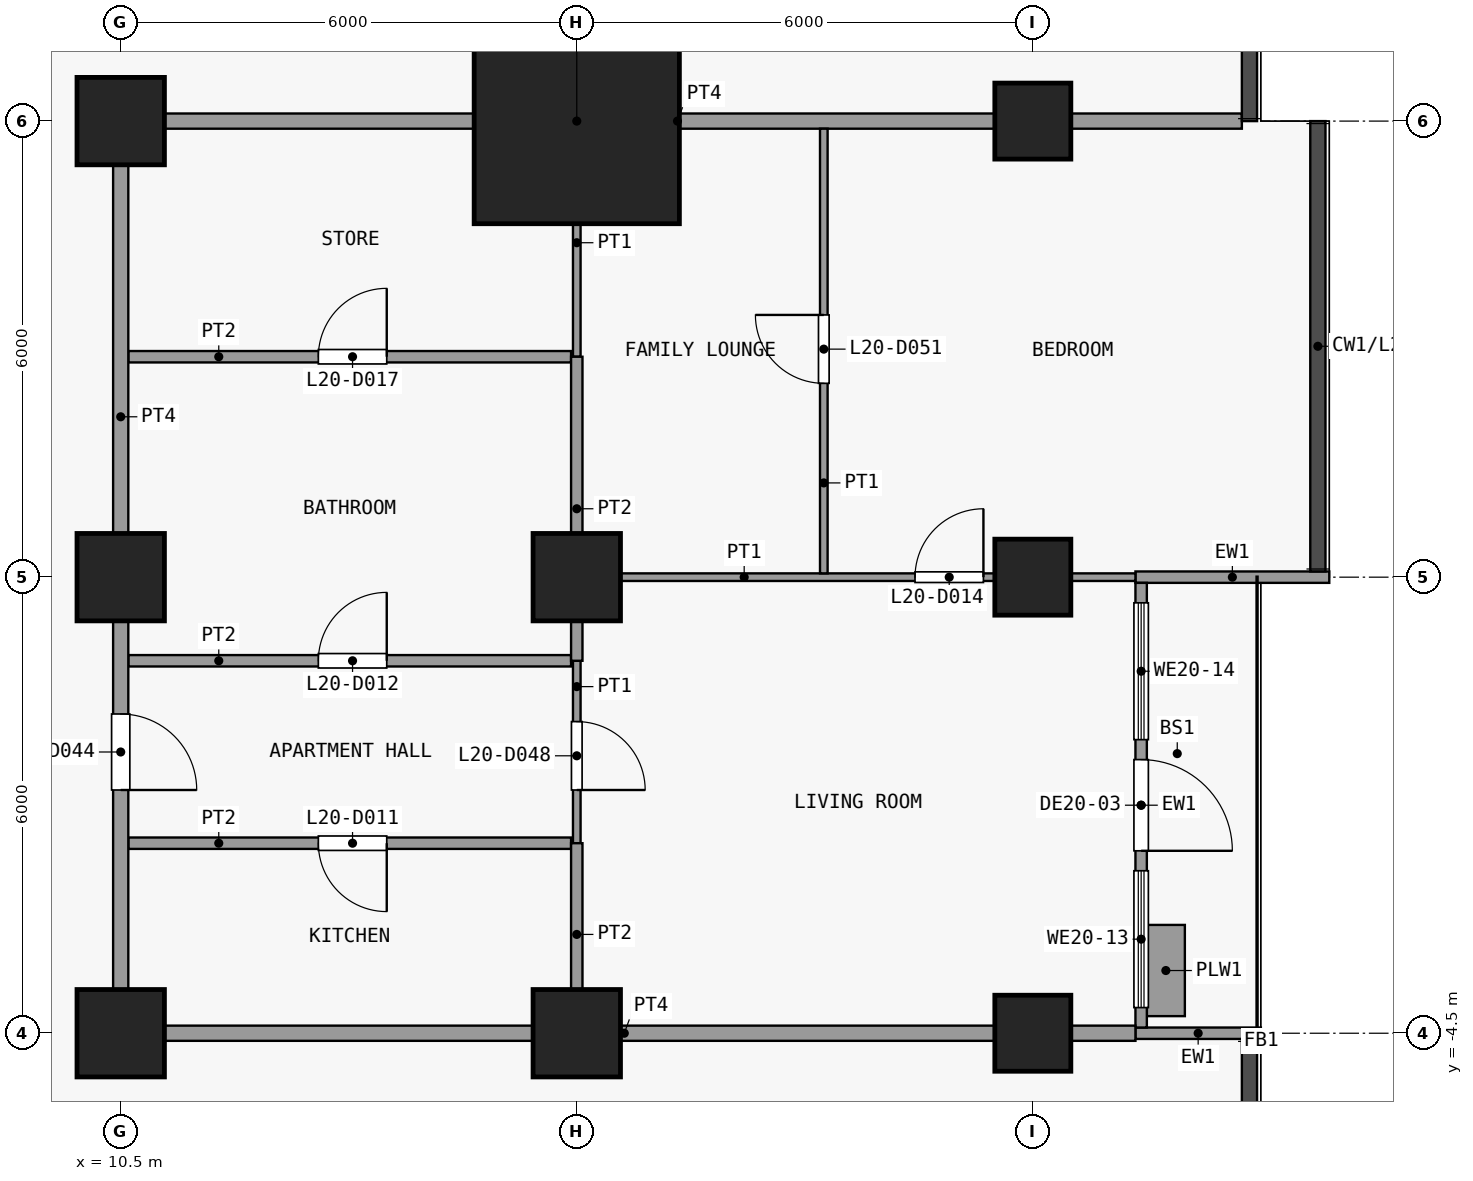
"""IFC4 building model, lengths in metres.
Left out: names, types, materials, properties, quantities, classifications, styles, units other than length and angle.
Written with IfcOpenShell. Run it as: python <this file> out.ifc"""

import sys

from ifc_helpers import new_model, si_unit, direction, frame, frame_2d, origin, origin_2d, place, context, subcontext, project, spatial, rectangle, extrude, element, fill, save


model = new_model("IFC4")
c1 = context("Model", 3, precision=1e-05, world=origin(), true_north=direction((0.0, 1.0)))
c2 = subcontext(c1, "Body", "Model", "MODEL_VIEW")
j1 = project(units=[si_unit("LENGTHUNIT", "METRE"), si_unit("PLANEANGLEUNIT", "RADIAN")], contexts=[c1])
p1 = place(None, origin())
s1 = spatial("IfcSite", under=j1, at=p1, CompositionType="ELEMENT")
p2 = place(p1, origin())
s2 = spatial("IfcBuilding", under=s1, at=p2, CompositionType="ELEMENT")
p3 = place(p2, frame((0.0, 0.0, 84.7)))
s3 = spatial("IfcBuildingStorey", under=s2, at=p3, CompositionType="ELEMENT", Elevation=84.7)
for number, where, z_axis, x_axis in (
    (1, (10.5, -4.5, 0.0), (0.0, 0.0, 1.0), (1.0, 0.0, 0.0)),
    (2, (10.5, 1.5, 0.0), (0.0, 0.0, 1.0), (1.0, 0.0, 0.0)),
    (3, (10.5, 7.5, 0.0), (0.0, 0.0, 1.0), (1.0, 0.0, 0.0)),
    (4, (16.5, -4.5, 0.0), (0.0, 0.0, 1.0), (1.0, 0.0, 0.0)),
    (5, (16.5, 1.5, 0.0), (0.0, 0.0, 1.0), (1.0, 0.0, 0.0)),
):
    element("IfcColumn", number, at=place(p3, frame(where, z_axis=z_axis, x_axis=x_axis)), inside=s3, PredefinedType="COLUMN", context=c2, shape_type="SweptSolid", body=[
        extrude(rectangle(XDim=1.15, YDim=1.15, at=origin_2d()), origin(), (0.0, 0.0, 1.0), 3.6),
    ])
p4 = place(p3, frame((16.5, 7.5, 0.0), z_axis=(0.0, 0.0, 1.0), x_axis=(1.0, 0.0, 0.0)))
e6 = element("IfcColumn", 6, at=p4, inside=s3, PredefinedType="COLUMN", context=c2, shape_type="SweptSolid", body=[
    extrude(rectangle(XDim=2.7, YDim=2.7, at=origin_2d()), origin(), (0.0, 0.0, 1.0), 3.6),
])
for number, where, z_axis, x_axis in (
    (7, (22.5, -4.5, 0.0), (0.0, 0.0, 1.0), (1.0, 0.0, 0.0)),
    (8, (22.5, 1.5, 0.0), (0.0, 0.0, 1.0), (1.0, 0.0, 0.0)),
    (9, (22.5, 7.5, 0.0), (0.0, 0.0, 1.0), (1.0, 0.0, 0.0)),
):
    element("IfcColumn", number, at=place(p3, frame(where, z_axis=z_axis, x_axis=x_axis)), inside=s3, PredefinedType="COLUMN", context=c2, shape_type="SweptSolid", body=[
        extrude(rectangle(XDim=1.0, YDim=1.0, at=origin_2d()), origin(), (0.0, 0.0, 1.0), 3.6),
    ])
p5 = place(p3, frame((23.85, -4.5, 0.0), z_axis=(0.0, 0.0, 1.0), x_axis=(1.0, 0.0, 0.0)))
e10 = element("IfcWall", 10, at=p5, inside=s3, PredefinedType="SOLIDWALL", context=c2, shape_type="SweptSolid", body=[
    extrude(rectangle(XDim=1.65, YDim=0.15, at=frame_2d((0.825, 0.0))), origin(), (0.0, 0.0, 1.0), 3.3),
])
p6 = place(p3, frame((23.85, 1.5, 0.0), z_axis=(0.0, 0.0, 1.0), x_axis=(1.0, 0.0, 0.0)))
e11 = element("IfcWall", 11, at=p6, inside=s3, PredefinedType="SOLIDWALL", context=c2, shape_type="SweptSolid", body=[
    extrude(rectangle(XDim=2.55, YDim=0.15, at=frame_2d((1.275, 0.0))), origin(), (0.0, 0.0, 1.0), 3.3),
])
p7 = place(p3, frame((23.925, 1.425, 0.0), z_axis=(0.0, 0.0, 1.0), x_axis=(0.0, -1.0, 0.0)))
e12 = element("IfcWall", 12, at=p7, inside=s3, PredefinedType="SOLIDWALL", context=c2, shape_type="SweptSolid", body=[
    extrude(rectangle(XDim=5.85, YDim=0.15, at=frame_2d((2.925, 0.0))), origin(), (0.0, 0.0, 1.0), 3.3),
])
p8 = place(p7, frame((2.325, 0.0, 0.0)))
e13 = element("IfcOpeningElement", 13, at=p8, cuts=e12, PredefinedType="OPENING", context=c2, shape_type="SweptSolid", body=[
    extrude(rectangle(XDim=1.2, YDim=2.4, at=frame_2d((0.6, 1.2))), frame((0.0, 0.085, 0.0), z_axis=(0.0, -1.0, 0.0), x_axis=(1.0, 0.0, 0.0)), (0.0, 0.0, 1.0), 0.17),
])
p9 = place(p7, frame((3.788, 0.0, 0.9)))
e14 = element("IfcOpeningElement", 14, at=p9, cuts=e12, PredefinedType="OPENING", context=c2, shape_type="SweptSolid", body=[
    extrude(rectangle(XDim=1.8, YDim=2.1, at=frame_2d((0.9, 1.05))), frame((0.0, 0.085, 0.0), z_axis=(0.0, -1.0, 0.0), x_axis=(1.0, 0.0, 0.0)), (0.0, 0.0, 1.0), 0.17),
])
p10 = place(p7, frame((0.262, 0.0, 0.9)))
e15 = element("IfcOpeningElement", 15, at=p10, cuts=e12, PredefinedType="OPENING", context=c2, shape_type="SweptSolid", body=[
    extrude(rectangle(XDim=1.8, YDim=2.1, at=frame_2d((0.9, 1.05))), frame((0.0, 0.085, 0.0), z_axis=(0.0, -1.0, 0.0), x_axis=(1.0, 0.0, 0.0)), (0.0, 0.0, 1.0), 0.17),
])
p11 = place(p3, frame((24.25, -4.275, 0.0), z_axis=(0.0, 0.0, 1.0), x_axis=(0.0, 1.0, 0.0)))
e16 = element("IfcWall", 16, at=p11, inside=s3, PredefinedType="USERDEFINED", context=c2, shape_type="SweptSolid", body=[
    extrude(rectangle(XDim=1.2, YDim=0.5, at=frame_2d((0.6, 0.0))), origin(), (0.0, 0.0, 1.0), 0.9),
])
p12 = place(p3, frame((10.4, -4.5, 0.0), z_axis=(0.0, 0.0, 1.0), x_axis=(1.0, 0.0, 0.0)))
e17 = element("IfcWall", 17, at=p12, inside=s3, PredefinedType="PARTITIONING", context=c2, shape_type="SweptSolid", body=[
    extrude(rectangle(XDim=13.45, YDim=0.2, at=frame_2d((6.725, 0.0))), origin(), (0.0, 0.0, 1.0), 3.3),
])
p13 = place(p3, frame((10.6, -2.0, 0.0), z_axis=(0.0, 0.0, 1.0), x_axis=(1.0, 0.0, 0.0)))
e18 = element("IfcWall", 18, at=p13, inside=s3, PredefinedType="PARTITIONING", context=c2, shape_type="SweptSolid", body=[
    extrude(rectangle(XDim=5.825, YDim=0.15, at=frame_2d((2.913, 0.0))), origin(), (0.0, 0.0, 1.0), 3.3),
])
p14 = place(p13, frame((2.5, 0.0, 0.0)))
e19 = element("IfcOpeningElement", 19, at=p14, cuts=e18, PredefinedType="OPENING", context=c2, shape_type="SweptSolid", body=[
    extrude(rectangle(XDim=0.9, YDim=2.1, at=frame_2d((0.45, 1.05))), frame((0.0, 0.085, 0.0), z_axis=(0.0, -1.0, 0.0), x_axis=(1.0, 0.0, 0.0)), (0.0, 0.0, 1.0), 0.17),
])
p15 = place(p3, frame((10.6, 0.4, 0.0), z_axis=(0.0, 0.0, 1.0), x_axis=(1.0, 0.0, 0.0)))
e20 = element("IfcWall", 20, at=p15, inside=s3, PredefinedType="PARTITIONING", context=c2, shape_type="SweptSolid", body=[
    extrude(rectangle(XDim=5.825, YDim=0.15, at=frame_2d((2.913, 0.0))), origin(), (0.0, 0.0, 1.0), 3.3),
])
p16 = place(p15, frame((2.5, 0.0, 0.0)))
e21 = element("IfcOpeningElement", 21, at=p16, cuts=e20, PredefinedType="OPENING", context=c2, shape_type="SweptSolid", body=[
    extrude(rectangle(XDim=0.9, YDim=2.1, at=frame_2d((0.45, 1.05))), frame((0.0, 0.085, 0.0), z_axis=(0.0, -1.0, 0.0), x_axis=(1.0, 0.0, 0.0)), (0.0, 0.0, 1.0), 0.17),
])
p17 = place(p3, frame((16.575, 1.5, 0.0), z_axis=(0.0, 0.0, 1.0), x_axis=(1.0, 0.0, 0.0)))
e22 = element("IfcWall", 22, at=p17, inside=s3, PredefinedType="PARTITIONING", context=c2, shape_type="SweptSolid", body=[
    extrude(rectangle(XDim=7.275, YDim=0.1, at=frame_2d((3.638, 0.0))), origin(), (0.0, 0.0, 1.0), 3.3),
])
p18 = place(p17, frame((4.375, 0.0, 0.0)))
e23 = element("IfcOpeningElement", 23, at=p18, cuts=e22, PredefinedType="OPENING", context=c2, shape_type="SweptSolid", body=[
    extrude(rectangle(XDim=0.9, YDim=2.1, at=frame_2d((0.45, 1.05))), frame((0.0, 0.06, 0.0), z_axis=(0.0, -1.0, 0.0), x_axis=(1.0, 0.0, 0.0)), (0.0, 0.0, 1.0), 0.12),
])
p19 = place(p3, frame((10.6, 4.4, 0.0), z_axis=(0.0, 0.0, 1.0), x_axis=(1.0, 0.0, 0.0)))
e24 = element("IfcWall", 24, at=p19, inside=s3, PredefinedType="PARTITIONING", context=c2, shape_type="SweptSolid", body=[
    extrude(rectangle(XDim=5.825, YDim=0.15, at=frame_2d((2.913, 0.0))), origin(), (0.0, 0.0, 1.0), 3.3),
])
p20 = place(p19, frame((2.5, 0.0, 0.0)))
e25 = element("IfcOpeningElement", 25, at=p20, cuts=e24, PredefinedType="OPENING", context=c2, shape_type="SweptSolid", body=[
    extrude(rectangle(XDim=0.9, YDim=2.1, at=frame_2d((0.45, 1.05))), frame((0.0, 0.085, 0.0), z_axis=(0.0, -1.0, 0.0), x_axis=(1.0, 0.0, 0.0)), (0.0, 0.0, 1.0), 0.17),
])
p21 = place(p3, frame((10.4, 7.5, 0.0), z_axis=(0.0, 0.0, 1.0), x_axis=(1.0, 0.0, 0.0)))
e26 = element("IfcWall", 26, at=p21, inside=s3, PredefinedType="PARTITIONING", context=c2, shape_type="SweptSolid", body=[
    extrude(rectangle(XDim=14.85, YDim=0.2, at=frame_2d((7.425, 0.0))), origin(), (0.0, 0.0, 1.0), 3.3),
])
p22 = place(p3, frame((10.5, -4.4, 0.0), z_axis=(0.0, 0.0, 1.0), x_axis=(0.0, 1.0, 0.0)))
e27 = element("IfcWall", 27, at=p22, inside=s3, PredefinedType="PARTITIONING", context=c2, shape_type="SweptSolid", body=[
    extrude(rectangle(XDim=11.8, YDim=0.2, at=frame_2d((5.9, 0.0))), origin(), (0.0, 0.0, 1.0), 3.3),
])
p23 = place(p22, frame((3.1, 0.0, 0.0)))
e28 = element("IfcOpeningElement", 28, at=p23, cuts=e27, PredefinedType="OPENING", context=c2, shape_type="SweptSolid", body=[
    extrude(rectangle(XDim=1.0, YDim=2.1, at=frame_2d((0.5, 1.05))), frame((0.0, 0.11, 0.0), z_axis=(0.0, -1.0, 0.0), x_axis=(1.0, 0.0, 0.0)), (0.0, 0.0, 1.0), 0.22),
])
p24 = place(p3, frame((16.5, -2.0, 0.0), z_axis=(0.0, 0.0, 1.0), x_axis=(0.0, 1.0, 0.0)))
e29 = element("IfcWall", 29, at=p24, inside=s3, PredefinedType="PARTITIONING", context=c2, shape_type="SweptSolid", body=[
    extrude(rectangle(XDim=2.4, YDim=0.1, at=frame_2d((1.2, 0.0))), origin(), (0.0, 0.0, 1.0), 3.3),
])
p25 = place(p24, frame((0.7, 0.0, 0.0)))
e30 = element("IfcOpeningElement", 30, at=p25, cuts=e29, PredefinedType="OPENING", context=c2, shape_type="SweptSolid", body=[
    extrude(rectangle(XDim=0.9, YDim=2.1, at=frame_2d((0.45, 1.05))), frame((0.0, 0.06, 0.0), z_axis=(0.0, -1.0, 0.0), x_axis=(1.0, 0.0, 0.0)), (0.0, 0.0, 1.0), 0.12),
])
p26 = place(p3, frame((16.5, 4.4, 0.0), z_axis=(0.0, 0.0, 1.0), x_axis=(0.0, 1.0, 0.0)))
e31 = element("IfcWall", 31, at=p26, inside=s3, PredefinedType="PARTITIONING", context=c2, shape_type="SweptSolid", body=[
    extrude(rectangle(XDim=3.0, YDim=0.1, at=frame_2d((1.5, 0.0))), origin(), (0.0, 0.0, 1.0), 3.3),
])
p27 = place(p3, frame((16.5, -4.4, 0.0), z_axis=(0.0, 0.0, 1.0), x_axis=(0.0, 1.0, 0.0)))
e32 = element("IfcWall", 32, at=p27, inside=s3, PredefinedType="PARTITIONING", context=c2, shape_type="SweptSolid", body=[
    extrude(rectangle(XDim=2.4, YDim=0.15, at=frame_2d((1.2, 0.0))), origin(), (0.0, 0.0, 1.0), 3.3),
])
p28 = place(p3, frame((16.5, 0.4, 0.0), z_axis=(0.0, 0.0, 1.0), x_axis=(0.0, 1.0, 0.0)))
e33 = element("IfcWall", 33, at=p28, inside=s3, PredefinedType="PARTITIONING", context=c2, shape_type="SweptSolid", body=[
    extrude(rectangle(XDim=4.0, YDim=0.15, at=frame_2d((2.0, 0.0))), origin(), (0.0, 0.0, 1.0), 3.3),
])
p29 = place(p3, frame((19.75, 1.55, 0.0), z_axis=(0.0, 0.0, 1.0), x_axis=(0.0, 1.0, 0.0)))
e34 = element("IfcWall", 34, at=p29, inside=s3, PredefinedType="PARTITIONING", context=c2, shape_type="SweptSolid", body=[
    extrude(rectangle(XDim=5.85, YDim=0.1, at=frame_2d((2.925, 0.0))), origin(), (0.0, 0.0, 1.0), 3.3),
])
p30 = place(p29, frame((2.5, 0.0, 0.0)))
e35 = element("IfcOpeningElement", 35, at=p30, cuts=e34, PredefinedType="OPENING", context=c2, shape_type="SweptSolid", body=[
    extrude(rectangle(XDim=0.9, YDim=2.1, at=frame_2d((0.45, 1.05))), frame((0.0, 0.06, 0.0), z_axis=(0.0, -1.0, 0.0), x_axis=(1.0, 0.0, 0.0)), (0.0, 0.0, 1.0), 0.12),
])
p31 = place(p8, origin())
e36 = element("IfcDoor", 36, at=p31, inside=s3, OperationType="SINGLE_SWING_RIGHT", PredefinedType="DOOR", context=c2, shape_type="SweptSolid", body=[
    extrude(rectangle(XDim=1.2, YDim=2.4, at=frame_2d((0.6, 1.2))), frame((0.0, 0.025, 0.0), z_axis=(0.0, -1.0, 0.0), x_axis=(1.0, 0.0, 0.0)), (0.0, 0.0, 1.0), 0.05),
])
fill(e13, e36)
p32 = place(p9, origin())
e37 = element("IfcWindow", 37, at=p32, inside=s3, PartitioningType="SINGLE_PANEL", PredefinedType="WINDOW", context=c2, shape_type="SweptSolid", body=[
    extrude(rectangle(XDim=1.8, YDim=2.1, at=frame_2d((0.9, 1.05))), frame((0.0, 0.03, 0.0), z_axis=(0.0, -1.0, 0.0), x_axis=(1.0, 0.0, 0.0)), (0.0, 0.0, 1.0), 0.06),
])
fill(e14, e37)
p33 = place(p10, origin())
e38 = element("IfcWindow", 38, at=p33, inside=s3, PartitioningType="SINGLE_PANEL", PredefinedType="WINDOW", context=c2, shape_type="SweptSolid", body=[
    extrude(rectangle(XDim=1.8, YDim=2.1, at=frame_2d((0.9, 1.05))), frame((0.0, 0.03, 0.0), z_axis=(0.0, -1.0, 0.0), x_axis=(1.0, 0.0, 0.0)), (0.0, 0.0, 1.0), 0.06),
])
fill(e15, e38)
p34 = place(p14, origin())
e39 = element("IfcDoor", 39, at=p34, inside=s3, OperationType="SINGLE_SWING_RIGHT", PredefinedType="DOOR", context=c2, shape_type="SweptSolid", body=[
    extrude(rectangle(XDim=0.9, YDim=2.1, at=frame_2d((0.45, 1.05))), frame((0.0, 0.025, 0.0), z_axis=(0.0, -1.0, 0.0), x_axis=(1.0, 0.0, 0.0)), (0.0, 0.0, 1.0), 0.05),
])
fill(e19, e39)
p35 = place(p16, origin())
e40 = element("IfcDoor", 40, at=p35, inside=s3, OperationType="SINGLE_SWING_LEFT", PredefinedType="DOOR", context=c2, shape_type="SweptSolid", body=[
    extrude(rectangle(XDim=0.9, YDim=2.1, at=frame_2d((0.45, 1.05))), frame((0.0, 0.025, 0.0), z_axis=(0.0, -1.0, 0.0), x_axis=(1.0, 0.0, 0.0)), (0.0, 0.0, 1.0), 0.05),
])
fill(e21, e40)
p36 = place(p18, origin())
e41 = element("IfcDoor", 41, at=p36, inside=s3, OperationType="SINGLE_SWING_LEFT", PredefinedType="DOOR", context=c2, shape_type="SweptSolid", body=[
    extrude(rectangle(XDim=0.9, YDim=2.1, at=frame_2d((0.45, 1.05))), frame((0.0, 0.025, 0.0), z_axis=(0.0, -1.0, 0.0), x_axis=(1.0, 0.0, 0.0)), (0.0, 0.0, 1.0), 0.05),
])
fill(e23, e41)
p37 = place(p20, origin())
e42 = element("IfcDoor", 42, at=p37, inside=s3, OperationType="SINGLE_SWING_LEFT", PredefinedType="DOOR", context=c2, shape_type="SweptSolid", body=[
    extrude(rectangle(XDim=0.9, YDim=2.1, at=frame_2d((0.45, 1.05))), frame((0.0, 0.025, 0.0), z_axis=(0.0, -1.0, 0.0), x_axis=(1.0, 0.0, 0.0)), (0.0, 0.0, 1.0), 0.05),
])
fill(e25, e42)
p38 = place(p23, origin())
e43 = element("IfcDoor", 43, at=p38, inside=s3, OperationType="SINGLE_SWING_LEFT", PredefinedType="DOOR", context=c2, shape_type="SweptSolid", body=[
    extrude(rectangle(XDim=1.0, YDim=2.1, at=frame_2d((0.5, 1.05))), frame((0.0, 0.025, 0.0), z_axis=(0.0, -1.0, 0.0), x_axis=(1.0, 0.0, 0.0)), (0.0, 0.0, 1.0), 0.05),
])
fill(e28, e43)
p39 = place(p25, origin())
e44 = element("IfcDoor", 44, at=p39, inside=s3, OperationType="SINGLE_SWING_LEFT", PredefinedType="DOOR", context=c2, shape_type="SweptSolid", body=[
    extrude(rectangle(XDim=0.9, YDim=2.1, at=frame_2d((0.45, 1.05))), frame((0.0, 0.025, 0.0), z_axis=(0.0, -1.0, 0.0), x_axis=(1.0, 0.0, 0.0)), (0.0, 0.0, 1.0), 0.05),
])
fill(e30, e44)
p40 = place(p30, origin())
e45 = element("IfcDoor", 45, at=p40, inside=s3, OperationType="SINGLE_SWING_LEFT", PredefinedType="DOOR", context=c2, shape_type="SweptSolid", body=[
    extrude(rectangle(XDim=0.9, YDim=2.1, at=frame_2d((0.45, 1.05))), frame((0.0, 0.025, 0.0), z_axis=(0.0, -1.0, 0.0), x_axis=(1.0, 0.0, 0.0)), (0.0, 0.0, 1.0), 0.05),
])
fill(e35, e45)
save(model, sys.argv[1])
